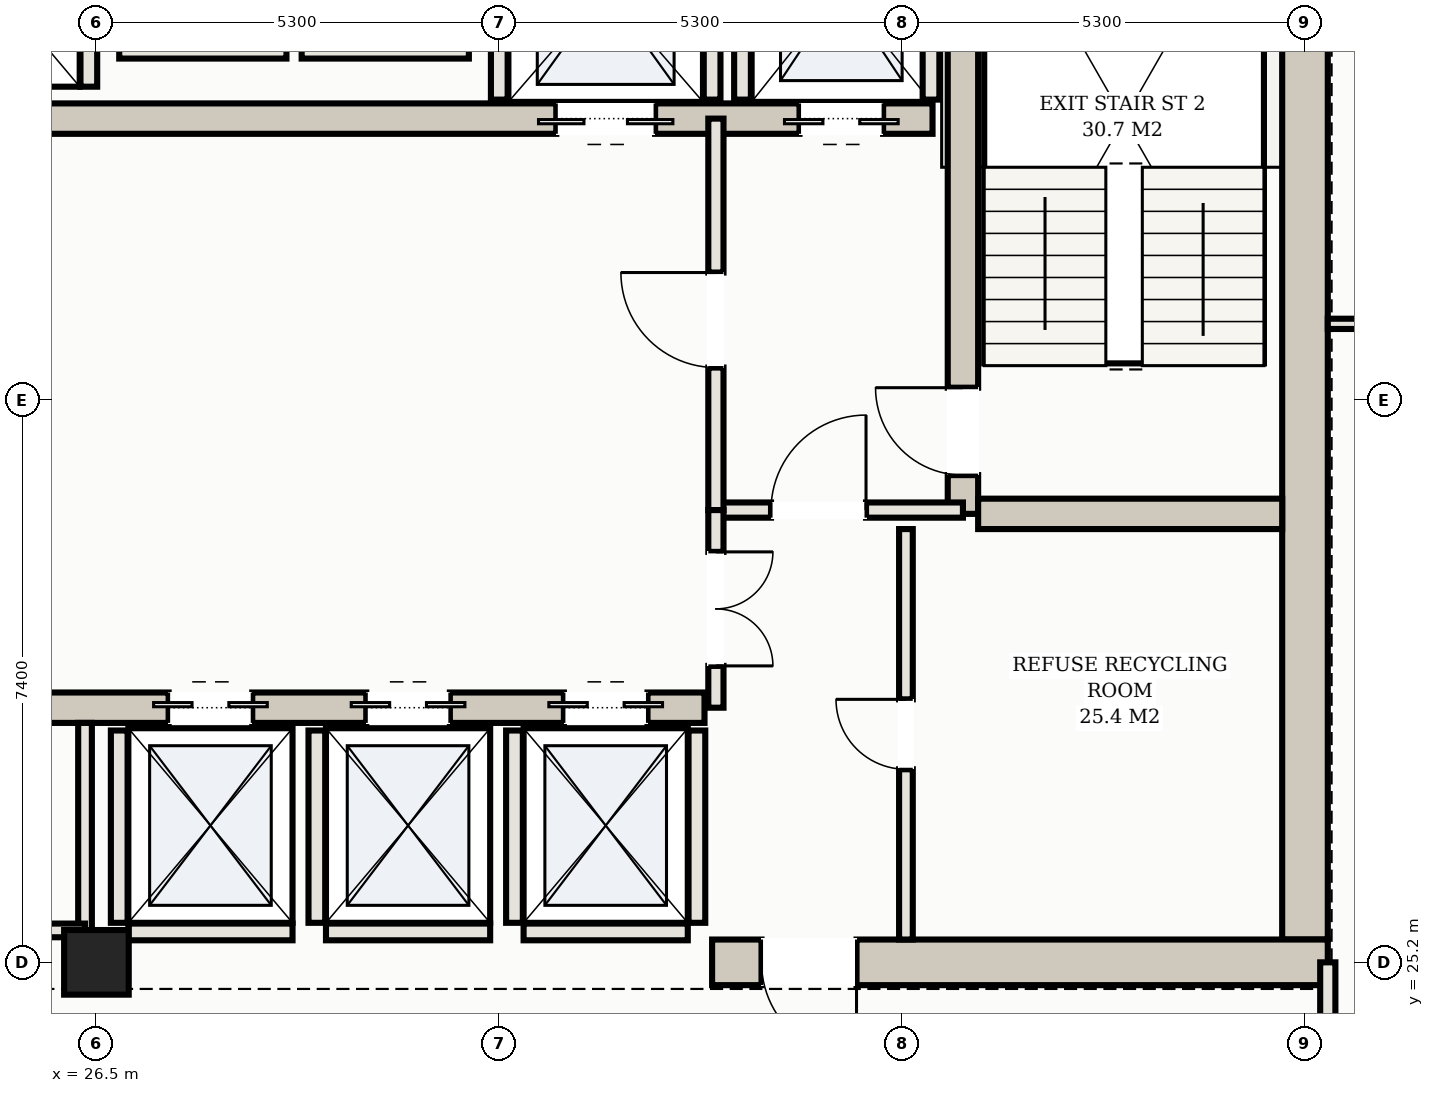
"""IFC4 building model, lengths in metres.
Left out: names, types, materials, properties, quantities, classifications, styles, units other than length and angle.
Written with IfcOpenShell. Run it as: python <this file> out.ifc"""

import sys

from ifc_helpers import new_model, si_unit, direction, frame, frame_2d, origin, origin_2d, place, context, subcontext, project, spatial, rectangle, hollow_rectangle, extrude, element, fill, save


model = new_model("IFC4")
c1 = context("Model", 3, precision=1e-05, world=origin(), true_north=direction((0.0, 1.0)))
c2 = subcontext(c1, "Body", "Model", "MODEL_VIEW")
j1 = project(units=[si_unit("LENGTHUNIT", "METRE"), si_unit("PLANEANGLEUNIT", "RADIAN")], contexts=[c1])
p1 = place(None, origin())
s1 = spatial("IfcSite", under=j1, at=p1, CompositionType="ELEMENT")
p2 = place(p1, origin())
s2 = spatial("IfcBuilding", under=s1, at=p2, CompositionType="ELEMENT")
p3 = place(p2, frame((0.0, 0.0, 168.9)))
s3 = spatial("IfcBuildingStorey", under=s2, at=p3, CompositionType="ELEMENT", Elevation=168.9)
p4 = place(p3, frame((42.4, 25.5, 0.0), z_axis=(0.0, 0.0, 1.0), x_axis=(0.0, 1.0, 0.0)))
e1 = element("IfcWall", 1, at=p4, inside=s3, PredefinedType="SHEAR", context=c2, shape_type="SweptSolid", body=[
    extrude(rectangle(XDim=14.2, YDim=0.6, at=frame_2d((7.1, 0.0))), origin(), (0.0, 0.0, 1.0), 3.1),
])
p5 = place(p3, frame((34.6, 25.2, 0.0), z_axis=(0.0, 0.0, 1.0), x_axis=(1.0, 0.0, 0.0)))
e2 = element("IfcWall", 2, at=p5, inside=s3, PredefinedType="SHEAR", context=c2, shape_type="SweptSolid", body=[
    extrude(rectangle(XDim=8.1, YDim=0.6, at=frame_2d((4.05, 0.0))), origin(), (0.0, 0.0, 1.0), 3.1),
])
p6 = place(p5, frame((0.65, 0.0, 0.0)))
e3 = element("IfcOpeningElement", 3, at=p6, cuts=e2, PredefinedType="OPENING", context=c2, shape_type="SweptSolid", body=[
    extrude(rectangle(XDim=1.25, YDim=2.2, at=frame_2d((0.625, 1.1))), frame((0.0, 0.31, 0.0), z_axis=(0.0, -1.0, 0.0), x_axis=(1.0, 0.0, 0.0)), (0.0, 0.0, 1.0), 0.62),
])
p7 = place(p3, frame((37.9, 31.1, 0.0), z_axis=(0.0, 0.0, 1.0), x_axis=(0.0, 1.0, 0.0)))
e4 = element("IfcWall", 4, at=p7, inside=s3, PredefinedType="SHEAR", context=c2, shape_type="SweptSolid", body=[
    extrude(rectangle(XDim=8.6, YDim=0.4, at=frame_2d((4.3, 0.0))), origin(), (0.0, 0.0, 1.0), 3.1),
])
p8 = place(p7, frame((0.51, 0.0, 0.0)))
e5 = element("IfcOpeningElement", 5, at=p8, cuts=e4, PredefinedType="OPENING", context=c2, shape_type="SweptSolid", body=[
    extrude(rectangle(XDim=1.15, YDim=2.2, at=frame_2d((0.575, 1.1))), frame((0.0, 0.21, 0.0), z_axis=(0.0, -1.0, 0.0), x_axis=(1.0, 0.0, 0.0)), (0.0, 0.0, 1.0), 0.42),
])
p9 = place(p3, frame((38.1, 31.1, 0.0), z_axis=(0.0, 0.0, 1.0), x_axis=(1.0, 0.0, 0.0)))
e6 = element("IfcWall", 6, at=p9, inside=s3, PredefinedType="SHEAR", context=c2, shape_type="SweptSolid", body=[
    extrude(rectangle(XDim=4.0, YDim=0.4, at=frame_2d((2.0, 0.0))), origin(), (0.0, 0.0, 1.0), 3.1),
])
p10 = place(p3, frame((15.5, 36.3, 0.0), z_axis=(0.0, 0.0, 1.0), x_axis=(1.0, 0.0, 0.0)))
e7 = element("IfcWall", 7, at=p10, inside=s3, PredefinedType="SHEAR", context=c2, shape_type="SweptSolid", body=[
    extrude(rectangle(XDim=22.0, YDim=0.4, at=frame_2d((11.0, 0.0))), origin(), (0.0, 0.0, 1.0), 3.1),
])
p11 = place(p10, frame((0.65, 0.0, 0.0)))
e8 = element("IfcOpeningElement", 8, at=p11, cuts=e7, PredefinedType="OPENING", context=c2, shape_type="SweptSolid", body=[
    extrude(rectangle(XDim=1.1, YDim=2.15, at=frame_2d((0.55, 1.075))), frame((0.0, 0.21, 0.0), z_axis=(0.0, -1.0, 0.0), x_axis=(1.0, 0.0, 0.0)), (0.0, 0.0, 1.0), 0.42),
])
p12 = place(p10, frame((20.25, 0.0, 0.0)))
e9 = element("IfcOpeningElement", 9, at=p12, cuts=e7, PredefinedType="OPENING", context=c2, shape_type="SweptSolid", body=[
    extrude(rectangle(XDim=1.1, YDim=2.15, at=frame_2d((0.55, 1.075))), frame((0.0, 0.21, 0.0), z_axis=(0.0, -1.0, 0.0), x_axis=(1.0, 0.0, 0.0)), (0.0, 0.0, 1.0), 0.42),
])
p13 = place(p10, frame((17.05, 0.0, 0.0)))
e10 = element("IfcOpeningElement", 10, at=p13, cuts=e7, PredefinedType="OPENING", context=c2, shape_type="SweptSolid", body=[
    extrude(rectangle(XDim=1.3, YDim=2.2, at=frame_2d((0.65, 1.1))), frame((0.0, 0.21, 0.0), z_axis=(0.0, -1.0, 0.0), x_axis=(1.0, 0.0, 0.0)), (0.0, 0.0, 1.0), 0.42),
])
p14 = place(p3, frame((18.5, 28.55, 0.0), z_axis=(0.0, 0.0, 1.0), x_axis=(1.0, 0.0, 0.0)))
e11 = element("IfcWall", 11, at=p14, inside=s3, PredefinedType="SHEAR", context=c2, shape_type="SweptSolid", body=[
    extrude(rectangle(XDim=16.0, YDim=0.4, at=frame_2d((8.0, 0.0))), origin(), (0.0, 0.0, 1.0), 3.1),
])
p15 = place(p14, frame((8.95, 0.0, 0.0)))
e12 = element("IfcOpeningElement", 12, at=p15, cuts=e11, PredefinedType="OPENING", context=c2, shape_type="SweptSolid", body=[
    extrude(rectangle(XDim=1.1, YDim=2.15, at=frame_2d((0.55, 1.075))), frame((0.0, 0.21, 0.0), z_axis=(0.0, -1.0, 0.0), x_axis=(1.0, 0.0, 0.0)), (0.0, 0.0, 1.0), 0.42),
])
p16 = place(p14, frame((11.55, 0.0, 0.0)))
e13 = element("IfcOpeningElement", 13, at=p16, cuts=e11, PredefinedType="OPENING", context=c2, shape_type="SweptSolid", body=[
    extrude(rectangle(XDim=1.1, YDim=2.15, at=frame_2d((0.55, 1.075))), frame((0.0, 0.21, 0.0), z_axis=(0.0, -1.0, 0.0), x_axis=(1.0, 0.0, 0.0)), (0.0, 0.0, 1.0), 0.42),
])
p17 = place(p14, frame((14.15, 0.0, 0.0)))
e14 = element("IfcOpeningElement", 14, at=p17, cuts=e11, PredefinedType="OPENING", context=c2, shape_type="SweptSolid", body=[
    extrude(rectangle(XDim=1.1, YDim=2.15, at=frame_2d((0.55, 1.075))), frame((0.0, 0.21, 0.0), z_axis=(0.0, -1.0, 0.0), x_axis=(1.0, 0.0, 0.0)), (0.0, 0.0, 1.0), 0.42),
])
p18 = place(p3, frame((26.5, 25.2, 0.0), z_axis=(0.0, 0.0, 1.0), x_axis=(1.0, 0.0, 0.0)))
e15 = element("IfcColumn", 15, at=p18, inside=s3, PredefinedType="COLUMN", context=c2, shape_type="SweptSolid", body=[
    extrude(hollow_rectangle(XDim=0.85, YDim=0.85, WallThickness=0.028, at=origin_2d()), origin(), (0.0, 0.0, 1.0), 3.3),
])
for number, where, z_axis, x_axis in (
    (16, (35.0, 36.55, 0.0), (0.0, 0.0, 1.0), (0.0, 1.0, 0.0)),
    (17, (37.48, 36.55, 0.0), (0.0, 0.0, 1.0), (0.0, 1.0, 0.0)),
    (18, (31.8, 36.55, 0.0), (0.0, 0.0, 1.0), (0.0, 1.0, 0.0)),
    (19, (34.6, 36.55, 0.0), (0.0, 0.0, 1.0), (0.0, 1.0, 0.0)),
):
    element("IfcWall", number, at=place(p3, frame(where, z_axis=z_axis, x_axis=x_axis)), inside=s3, PredefinedType="SOLIDWALL", context=c2, shape_type="SweptSolid", body=[
        extrude(rectangle(XDim=2.93, YDim=0.22, at=frame_2d((1.465, 0.0))), origin(), (0.0, 0.0, 1.0), 3.1),
    ])
p19 = place(p3, frame((26.8, 25.72, 0.0), z_axis=(0.0, 0.0, 1.0), x_axis=(0.0, 1.0, 0.0)))
e20 = element("IfcWall", 20, at=p19, inside=s3, PredefinedType="SOLIDWALL", context=c2, shape_type="SweptSolid", body=[
    extrude(rectangle(XDim=2.53, YDim=0.22, at=frame_2d((1.265, 0.0))), origin(), (0.0, 0.0, 1.0), 3.1),
])
p20 = place(p3, frame((26.92, 25.6, 0.0), z_axis=(0.0, 0.0, 1.0), x_axis=(1.0, 0.0, 0.0)))
e21 = element("IfcWall", 21, at=p20, inside=s3, PredefinedType="SOLIDWALL", context=c2, shape_type="SweptSolid", body=[
    extrude(rectangle(XDim=2.16, YDim=0.22, at=frame_2d((1.08, 0.0))), origin(), (0.0, 0.0, 1.0), 2.295),
])
p21 = place(p3, frame((29.4, 25.72, 0.0), z_axis=(0.0, 0.0, 1.0), x_axis=(0.0, 1.0, 0.0)))
e22 = element("IfcWall", 22, at=p21, inside=s3, PredefinedType="SOLIDWALL", context=c2, shape_type="SweptSolid", body=[
    extrude(rectangle(XDim=2.53, YDim=0.22, at=frame_2d((1.265, 0.0))), origin(), (0.0, 0.0, 1.0), 3.1),
])
p22 = place(p3, frame((29.52, 25.6, 0.0), z_axis=(0.0, 0.0, 1.0), x_axis=(1.0, 0.0, 0.0)))
e23 = element("IfcWall", 23, at=p22, inside=s3, PredefinedType="SOLIDWALL", context=c2, shape_type="SweptSolid", body=[
    extrude(rectangle(XDim=2.16, YDim=0.22, at=frame_2d((1.08, 0.0))), origin(), (0.0, 0.0, 1.0), 2.295),
])
for number, where, z_axis, x_axis in (
    (24, (32.0, 25.72, 0.0), (0.0, 0.0, 1.0), (0.0, 1.0, 0.0)),
    (25, (34.4, 25.72, 0.0), (0.0, 0.0, 1.0), (0.0, 1.0, 0.0)),
):
    element("IfcWall", number, at=place(p3, frame(where, z_axis=z_axis, x_axis=x_axis)), inside=s3, PredefinedType="SOLIDWALL", context=c2, shape_type="SweptSolid", body=[
        extrude(rectangle(XDim=2.53, YDim=0.22, at=frame_2d((1.265, 0.0))), origin(), (0.0, 0.0, 1.0), 3.1),
    ])
p23 = place(p3, frame((32.12, 25.6, 0.0), z_axis=(0.0, 0.0, 1.0), x_axis=(1.0, 0.0, 0.0)))
e26 = element("IfcWall", 26, at=p23, inside=s3, PredefinedType="SOLIDWALL", context=c2, shape_type="SweptSolid", body=[
    extrude(rectangle(XDim=2.16, YDim=0.22, at=frame_2d((1.08, 0.0))), origin(), (0.0, 0.0, 1.0), 2.295),
])
p24 = place(p3, frame((26.4, 36.72, 0.0), z_axis=(0.0, 0.0, 1.0), x_axis=(0.0, 1.0, 0.0)))
e27 = element("IfcWall", 27, at=p24, inside=s3, PredefinedType="SOLIDWALL", context=c2, shape_type="SweptSolid", body=[
    extrude(rectangle(XDim=2.56, YDim=0.22, at=frame_2d((1.28, 0.0))), origin(), (0.0, 0.0, 1.0), 3.1),
])
for number, where, z_axis, x_axis in (
    (28, (26.8, 37.2, 0.0), (0.0, 0.0, 1.0), (1.0, 0.0, 0.0)),
    (29, (29.2, 37.2, 0.0), (0.0, 0.0, 1.0), (1.0, 0.0, 0.0)),
):
    element("IfcWall", number, at=place(p3, frame(where, z_axis=z_axis, x_axis=x_axis)), inside=s3, PredefinedType="SOLIDWALL", context=c2, shape_type="SweptSolid", body=[
        extrude(rectangle(XDim=2.2, YDim=0.22, at=frame_2d((1.1, 0.0))), origin(), (0.0, 0.0, 1.0), 3.1),
    ])
p25 = place(p3, frame((34.65, 31.15, 0.0), z_axis=(0.0, 0.0, 1.0), x_axis=(1.0, 0.0, 0.0)))
e30 = element("IfcWall", 30, at=p25, inside=s3, PredefinedType="PARTITIONING", context=c2, shape_type="SweptSolid", body=[
    extrude(rectangle(XDim=3.25, YDim=0.2, at=frame_2d((1.625, 0.0))), origin(), (0.0, 0.0, 1.0), 2.38),
])
p26 = place(p25, frame((0.725, 0.0, 0.0)))
e31 = element("IfcOpeningElement", 31, at=p26, cuts=e30, PredefinedType="OPENING", context=c2, shape_type="SweptSolid", body=[
    extrude(rectangle(XDim=1.25, YDim=2.2, at=frame_2d((0.625, 1.1))), frame((0.0, 0.11, 0.0), z_axis=(0.0, -1.0, 0.0), x_axis=(1.0, 0.0, 0.0)), (0.0, 0.0, 1.0), 0.22),
])
p27 = place(p3, frame((34.65, 31.15, 0.0), z_axis=(0.0, 0.0, 1.0), x_axis=(0.0, 1.0, 0.0)))
e32 = element("IfcWall", 32, at=p27, inside=s3, PredefinedType="PARTITIONING", context=c2, shape_type="SweptSolid", body=[
    extrude(rectangle(XDim=5.15, YDim=0.2, at=frame_2d((2.575, 0.0))), origin(), (0.0, 0.0, 1.0), 2.38),
])
p28 = place(p27, frame((1.875, 0.0, 0.0)))
e33 = element("IfcOpeningElement", 33, at=p28, cuts=e32, PredefinedType="OPENING", context=c2, shape_type="SweptSolid", body=[
    extrude(rectangle(XDim=1.25, YDim=2.2, at=frame_2d((0.625, 1.1))), frame((0.0, 0.11, 0.0), z_axis=(0.0, -1.0, 0.0), x_axis=(1.0, 0.0, 0.0)), (0.0, 0.0, 1.0), 0.22),
])
p29 = place(p3, frame((37.15, 25.5, 0.0), z_axis=(0.0, 0.0, 1.0), x_axis=(0.0, 1.0, 0.0)))
e34 = element("IfcWall", 34, at=p29, inside=s3, PredefinedType="PARTITIONING", context=c2, shape_type="SweptSolid", body=[
    extrude(rectangle(XDim=5.4, YDim=0.18, at=frame_2d((2.7, 0.0))), origin(), (0.0, 0.0, 1.0), 2.38),
])
p30 = place(p29, frame((2.24, 0.0, 0.0)))
e35 = element("IfcOpeningElement", 35, at=p30, cuts=e34, PredefinedType="OPENING", context=c2, shape_type="SweptSolid", body=[
    extrude(rectangle(XDim=0.92, YDim=2.15, at=frame_2d((0.46, 1.075))), frame((0.0, 0.1, 0.0), z_axis=(0.0, -1.0, 0.0), x_axis=(1.0, 0.0, 0.0)), (0.0, 0.0, 1.0), 0.2),
])
p31 = place(p3, frame((34.65, 28.55, 0.0), z_axis=(0.0, 0.0, 1.0), x_axis=(0.0, 1.0, 0.0)))
e36 = element("IfcWall", 36, at=p31, inside=s3, PredefinedType="PARTITIONING", context=c2, shape_type="SweptSolid", body=[
    extrude(rectangle(XDim=2.6, YDim=0.2, at=frame_2d((1.3, 0.0))), origin(), (0.0, 0.0, 1.0), 2.38),
])
p32 = place(p31, frame((0.55, 0.0, 0.0)))
e37 = element("IfcOpeningElement", 37, at=p32, cuts=e36, PredefinedType="OPENING", context=c2, shape_type="SweptSolid", body=[
    extrude(rectangle(XDim=1.5, YDim=2.25, at=frame_2d((0.75, 1.125))), frame((0.0, 0.11, 0.0), z_axis=(0.0, -1.0, 0.0), x_axis=(1.0, 0.0, 0.0)), (0.0, 0.0, 1.0), 0.22),
])
p33 = place(p3, frame((26.35, 25.62, 0.0), z_axis=(0.0, 0.0, 1.0), x_axis=(0.0, 1.0, 0.0)))
e38 = element("IfcWall", 38, at=p33, inside=s3, PredefinedType="PARTITIONING", context=c2, shape_type="SweptSolid", body=[
    extrude(rectangle(XDim=2.73, YDim=0.18, at=frame_2d((1.365, 0.0))), origin(), (0.0, 0.0, 1.0), 2.38),
])
p34 = place(p3, frame((18.45, 25.62, 0.0), z_axis=(0.0, 0.0, 1.0), x_axis=(1.0, 0.0, 0.0)))
e39 = element("IfcWall", 39, at=p34, inside=s3, PredefinedType="PARTITIONING", context=c2, shape_type="SweptSolid", body=[
    extrude(rectangle(XDim=7.9, YDim=0.18, at=frame_2d((3.95, 0.0))), origin(), (0.0, 0.0, 1.0), 2.38),
])
p35 = place(p34, frame((3.34, 0.0, 0.0)))
e40 = element("IfcOpeningElement", 40, at=p35, cuts=e39, PredefinedType="OPENING", context=c2, shape_type="SweptSolid", body=[
    extrude(rectangle(XDim=0.92, YDim=2.15, at=frame_2d((0.46, 1.075))), frame((0.0, 0.1, 0.0), z_axis=(0.0, -1.0, 0.0), x_axis=(1.0, 0.0, 0.0)), (0.0, 0.0, 1.0), 0.2),
])
p36 = place(p3, frame((42.7, 23.3, 0.0), z_axis=(0.0, 0.0, 1.0), x_axis=(0.0, 1.0, 0.0)))
e41 = element("IfcWall", 41, at=p36, inside=s3, PredefinedType="PARTITIONING", context=c2, shape_type="SweptSolid", body=[
    extrude(rectangle(XDim=1.9, YDim=0.2, at=frame_2d((0.95, 0.0))), origin(), (0.0, 0.0, 1.0), 2.38),
])
p37 = place(p3, frame((42.7, 33.6, 0.0), z_axis=(0.0, 0.0, 1.0), x_axis=(1.0, 0.0, 0.0)))
e42 = element("IfcWall", 42, at=p37, inside=s3, PredefinedType="PARTITIONING", context=c2, shape_type="SweptSolid", body=[
    extrude(rectangle(XDim=5.98, YDim=0.135, at=frame_2d((2.99, 0.0))), origin(), (0.0, 0.0, 1.0), 2.38),
])
p38 = place(p37, frame((2.53, 0.0, 0.0)))
e43 = element("IfcOpeningElement", 43, at=p38, cuts=e42, PredefinedType="OPENING", context=c2, shape_type="SweptSolid", body=[
    extrude(rectangle(XDim=0.92, YDim=2.15, at=frame_2d((0.46, 1.075))), frame((0.0, 0.078, 0.0), z_axis=(0.0, -1.0, 0.0), x_axis=(1.0, 0.0, 0.0)), (0.0, 0.0, 1.0), 0.155),
])
p39 = place(p12, frame((1.1, 0.0, 0.0), z_axis=(0.0, 0.0, 1.0), x_axis=(-1.0, 0.0, 0.0)))
e44 = element("IfcDoor", 44, at=p39, inside=s3, OperationType="DOUBLE_DOOR_SLIDING", PredefinedType="DOOR", context=c2, shape_type="SweptSolid", body=[
    extrude(rectangle(XDim=1.1, YDim=2.15, at=frame_2d((0.55, 1.075))), frame((0.0, 0.025, 0.0), z_axis=(0.0, -1.0, 0.0), x_axis=(1.0, 0.0, 0.0)), (0.0, 0.0, 1.0), 0.05),
])
fill(e9, e44)
p40 = place(p13, frame((1.3, 0.0, 0.0), z_axis=(0.0, 0.0, 1.0), x_axis=(-1.0, 0.0, 0.0)))
e45 = element("IfcDoor", 45, at=p40, inside=s3, OperationType="DOUBLE_DOOR_SLIDING", PredefinedType="DOOR", context=c2, shape_type="SweptSolid", body=[
    extrude(rectangle(XDim=1.3, YDim=2.2, at=frame_2d((0.65, 1.1))), frame((0.0, 0.025, 0.0), z_axis=(0.0, -1.0, 0.0), x_axis=(1.0, 0.0, 0.0)), (0.0, 0.0, 1.0), 0.05),
])
fill(e10, e45)
p41 = place(p15, origin())
e46 = element("IfcDoor", 46, at=p41, inside=s3, OperationType="DOUBLE_DOOR_SLIDING", PredefinedType="DOOR", context=c2, shape_type="SweptSolid", body=[
    extrude(rectangle(XDim=1.1, YDim=2.15, at=frame_2d((0.55, 1.075))), frame((0.0, 0.025, 0.0), z_axis=(0.0, -1.0, 0.0), x_axis=(1.0, 0.0, 0.0)), (0.0, 0.0, 1.0), 0.05),
])
fill(e12, e46)
p42 = place(p16, origin())
e47 = element("IfcDoor", 47, at=p42, inside=s3, OperationType="DOUBLE_DOOR_SLIDING", PredefinedType="DOOR", context=c2, shape_type="SweptSolid", body=[
    extrude(rectangle(XDim=1.1, YDim=2.15, at=frame_2d((0.55, 1.075))), frame((0.0, 0.025, 0.0), z_axis=(0.0, -1.0, 0.0), x_axis=(1.0, 0.0, 0.0)), (0.0, 0.0, 1.0), 0.05),
])
fill(e13, e47)
p43 = place(p17, origin())
e48 = element("IfcDoor", 48, at=p43, inside=s3, OperationType="DOUBLE_DOOR_SLIDING", PredefinedType="DOOR", context=c2, shape_type="SweptSolid", body=[
    extrude(rectangle(XDim=1.1, YDim=2.15, at=frame_2d((0.55, 1.075))), frame((0.0, 0.025, 0.0), z_axis=(0.0, -1.0, 0.0), x_axis=(1.0, 0.0, 0.0)), (0.0, 0.0, 1.0), 0.05),
])
fill(e14, e48)
p44 = place(p6, frame((1.25, 0.0, 0.0), z_axis=(0.0, 0.0, 1.0), x_axis=(-1.0, 0.0, 0.0)))
e49 = element("IfcDoor", 49, at=p44, inside=s3, OperationType="SINGLE_SWING_LEFT", PredefinedType="DOOR", context=c2, shape_type="SweptSolid", body=[
    extrude(rectangle(XDim=1.25, YDim=2.2, at=frame_2d((0.625, 1.1))), frame((0.0, 0.025, 0.0), z_axis=(0.0, -1.0, 0.0), x_axis=(1.0, 0.0, 0.0)), (0.0, 0.0, 1.0), 0.05),
])
fill(e3, e49)
p45 = place(p26, origin())
e50 = element("IfcDoor", 50, at=p45, inside=s3, OperationType="SINGLE_SWING_RIGHT", PredefinedType="DOOR", context=c2, shape_type="SweptSolid", body=[
    extrude(rectangle(XDim=1.25, YDim=2.2, at=frame_2d((0.625, 1.1))), frame((0.0, 0.025, 0.0), z_axis=(0.0, -1.0, 0.0), x_axis=(1.0, 0.0, 0.0)), (0.0, 0.0, 1.0), 0.05),
])
fill(e31, e50)
p46 = place(p28, origin())
e51 = element("IfcDoor", 51, at=p46, inside=s3, OperationType="SINGLE_SWING_RIGHT", PredefinedType="DOOR", context=c2, shape_type="SweptSolid", body=[
    extrude(rectangle(XDim=1.25, YDim=2.2, at=frame_2d((0.625, 1.1))), frame((0.0, 0.025, 0.0), z_axis=(0.0, -1.0, 0.0), x_axis=(1.0, 0.0, 0.0)), (0.0, 0.0, 1.0), 0.05),
])
fill(e33, e51)
p47 = place(p8, origin())
e52 = element("IfcDoor", 52, at=p47, inside=s3, OperationType="SINGLE_SWING_RIGHT", PredefinedType="DOOR", context=c2, shape_type="SweptSolid", body=[
    extrude(rectangle(XDim=1.15, YDim=2.2, at=frame_2d((0.575, 1.1))), frame((0.0, 0.025, 0.0), z_axis=(0.0, -1.0, 0.0), x_axis=(1.0, 0.0, 0.0)), (0.0, 0.0, 1.0), 0.05),
])
fill(e5, e52)
p48 = place(p30, origin())
e53 = element("IfcDoor", 53, at=p48, inside=s3, OperationType="SINGLE_SWING_RIGHT", PredefinedType="DOOR", context=c2, shape_type="SweptSolid", body=[
    extrude(rectangle(XDim=0.92, YDim=2.15, at=frame_2d((0.46, 1.075))), frame((0.0, 0.025, 0.0), z_axis=(0.0, -1.0, 0.0), x_axis=(1.0, 0.0, 0.0)), (0.0, 0.0, 1.0), 0.05),
])
fill(e35, e53)
p49 = place(p32, frame((1.5, 0.0, 0.0), z_axis=(0.0, 0.0, 1.0), x_axis=(-1.0, 0.0, 0.0)))
e54 = element("IfcDoor", 54, at=p49, inside=s3, OperationType="DOUBLE_DOOR_SINGLE_SWING", PredefinedType="DOOR", context=c2, shape_type="SweptSolid", body=[
    extrude(rectangle(XDim=1.5, YDim=2.25, at=frame_2d((0.75, 1.125))), frame((0.0, 0.025, 0.0), z_axis=(0.0, -1.0, 0.0), x_axis=(1.0, 0.0, 0.0)), (0.0, 0.0, 1.0), 0.05),
])
fill(e37, e54)
save(model, sys.argv[1])
